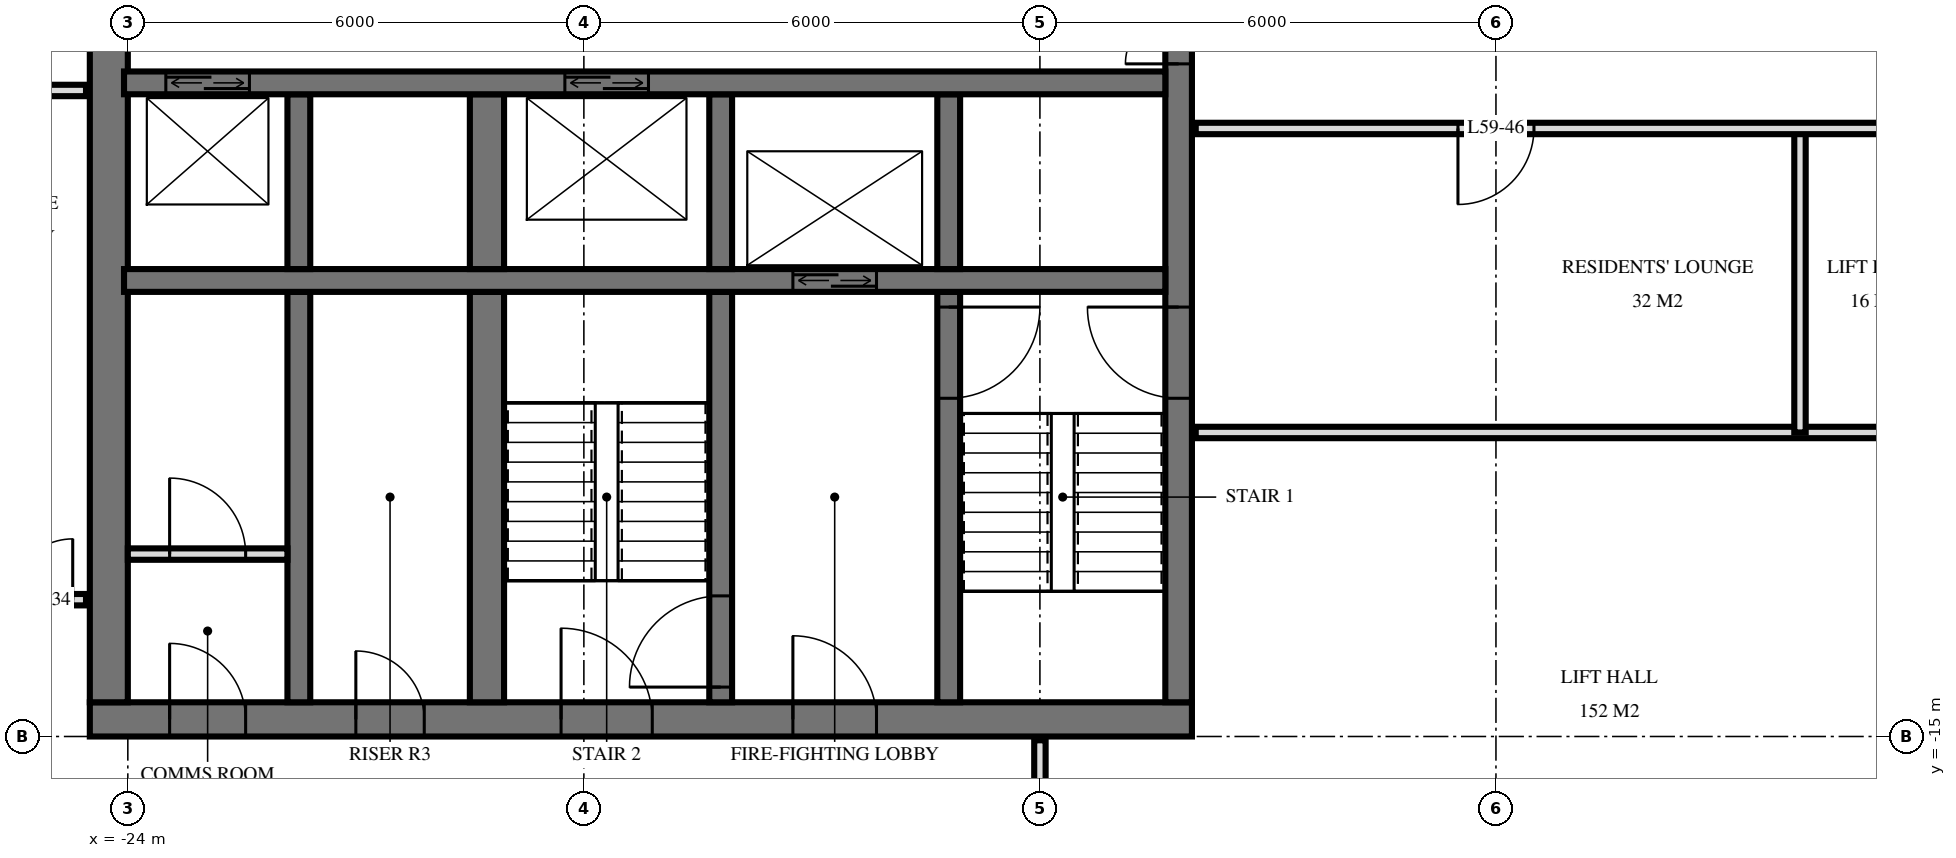
"""IFC4 building model, lengths in metres.
Left out: names, types, materials, properties, quantities, classifications, styles, units other than length and angle.
Written with IfcOpenShell. Run it as: python <this file> out.ifc"""

import sys

from ifc_helpers import new_model, si_unit, direction, frame, frame_2d, origin, place, context, subcontext, project, spatial, rectangle, extrude, element, fill, save


model = new_model("IFC4")
c1 = context("Model", 3, precision=1e-05, world=origin(), true_north=direction((0.0, 1.0)))
c2 = subcontext(c1, "Body", "Model", "MODEL_VIEW")
j1 = project(units=[si_unit("LENGTHUNIT", "METRE"), si_unit("PLANEANGLEUNIT", "RADIAN")], contexts=[c1])
p1 = place(None, origin())
s1 = spatial("IfcSite", under=j1, at=p1, CompositionType="ELEMENT")
p2 = place(p1, origin())
s2 = spatial("IfcBuilding", under=s1, at=p2, CompositionType="ELEMENT")
p3 = place(p2, frame((0.0, 0.0, 225.6)))
s3 = spatial("IfcBuildingStorey", under=s2, at=p3, CompositionType="ELEMENT", Elevation=225.6)
p4 = place(p3, frame((-24.5, -14.775, 0.0), z_axis=(0.0, 0.0, 1.0), x_axis=(1.0, 0.0, 0.0)))
e1 = element("IfcWall", 1, at=p4, inside=s3, PredefinedType="SHEAR", context=c2, shape_type="SweptSolid", body=[
    extrude(rectangle(XDim=14.5, YDim=0.45, at=frame_2d((7.25, 0.0))), origin(), (0.0, 0.0, 1.0), 3.5),
])
p5 = place(p4, frame((6.2, 0.0, 0.0)))
e2 = element("IfcOpeningElement", 2, at=p5, cuts=e1, PredefinedType="OPENING", context=c2, shape_type="SweptSolid", body=[
    extrude(rectangle(XDim=1.2, YDim=2.1, at=frame_2d((0.6, 1.05))), frame((0.0, 0.235, 0.0), z_axis=(0.0, -1.0, 0.0), x_axis=(1.0, 0.0, 0.0)), (0.0, 0.0, 1.0), 0.47),
])
p6 = place(p4, frame((9.25, 0.0, 0.0)))
e3 = element("IfcOpeningElement", 3, at=p6, cuts=e1, PredefinedType="OPENING", context=c2, shape_type="SweptSolid", body=[
    extrude(rectangle(XDim=1.1, YDim=2.1, at=frame_2d((0.55, 1.05))), frame((0.0, 0.235, 0.0), z_axis=(0.0, -1.0, 0.0), x_axis=(1.0, 0.0, 0.0)), (0.0, 0.0, 1.0), 0.47),
])
p7 = place(p4, frame((3.5, 0.0, 0.0)))
e4 = element("IfcOpeningElement", 4, at=p7, cuts=e1, PredefinedType="OPENING", context=c2, shape_type="SweptSolid", body=[
    extrude(rectangle(XDim=0.9, YDim=2.1, at=frame_2d((0.45, 1.05))), frame((0.0, 0.235, 0.0), z_axis=(0.0, -1.0, 0.0), x_axis=(1.0, 0.0, 0.0)), (0.0, 0.0, 1.0), 0.47),
])
p8 = place(p4, frame((1.05, 0.0, 0.0)))
e5 = element("IfcOpeningElement", 5, at=p8, cuts=e1, PredefinedType="OPENING", context=c2, shape_type="SweptSolid", body=[
    extrude(rectangle(XDim=1.0, YDim=2.1, at=frame_2d((0.5, 1.05))), frame((0.0, 0.235, 0.0), z_axis=(0.0, -1.0, 0.0), x_axis=(1.0, 0.0, 0.0)), (0.0, 0.0, 1.0), 0.47),
])
p9 = place(p3, frame((-10.175, -14.55, 0.0), z_axis=(0.0, 0.0, 1.0), x_axis=(0.0, 1.0, 0.0)))
e6 = element("IfcWall", 6, at=p9, inside=s3, PredefinedType="SHEAR", context=c2, shape_type="SweptSolid", body=[
    extrude(rectangle(XDim=14.1, YDim=0.35, at=frame_2d((7.05, 0.0))), origin(), (0.0, 0.0, 1.0), 3.5),
])
p10 = place(p9, frame((8.4, 0.0, 0.0)))
e7 = element("IfcOpeningElement", 7, at=p10, cuts=e6, PredefinedType="OPENING", context=c2, shape_type="SweptSolid", body=[
    extrude(rectangle(XDim=1.4, YDim=2.4, at=frame_2d((0.7, 1.2))), frame((0.0, 0.185, 0.0), z_axis=(0.0, -1.0, 0.0), x_axis=(1.0, 0.0, 0.0)), (0.0, 0.0, 1.0), 0.37),
])
p11 = place(p9, frame((10.0, 0.0, 0.0)))
e8 = element("IfcOpeningElement", 8, at=p11, cuts=e6, PredefinedType="OPENING", context=c2, shape_type="SweptSolid", body=[
    extrude(rectangle(XDim=1.4, YDim=2.4, at=frame_2d((0.7, 1.2))), frame((0.0, 0.185, 0.0), z_axis=(0.0, -1.0, 0.0), x_axis=(1.0, 0.0, 0.0)), (0.0, 0.0, 1.0), 0.37),
])
p12 = place(p9, frame((4.0, 0.0, 0.0)))
e9 = element("IfcOpeningElement", 9, at=p12, cuts=e6, PredefinedType="OPENING", context=c2, shape_type="SweptSolid", body=[
    extrude(rectangle(XDim=1.2, YDim=2.1, at=frame_2d((0.6, 1.05))), frame((0.0, 0.185, 0.0), z_axis=(0.0, -1.0, 0.0), x_axis=(1.0, 0.0, 0.0)), (0.0, 0.0, 1.0), 0.37),
])
p13 = place(p3, frame((-24.25, -14.55, 0.0), z_axis=(0.0, 0.0, 1.0), x_axis=(0.0, 1.0, 0.0)))
e10 = element("IfcWall", 10, at=p13, inside=s3, PredefinedType="SHEAR", context=c2, shape_type="SweptSolid", body=[
    extrude(rectangle(XDim=14.1, YDim=0.5, at=frame_2d((7.05, 0.0))), origin(), (0.0, 0.0, 1.0), 3.5),
])
p14 = place(p3, frame((-24.05, -6.4, 0.0), z_axis=(0.0, 0.0, 1.0), x_axis=(1.0, 0.0, 0.0)))
e11 = element("IfcWall", 11, at=p14, inside=s3, PredefinedType="SHEAR", context=c2, shape_type="SweptSolid", body=[
    extrude(rectangle(XDim=13.7, YDim=0.3, at=frame_2d((6.85, 0.0))), origin(), (0.0, 0.0, 1.0), 3.5),
])
p15 = place(p14, frame((0.55, 0.0, 0.0)))
e12 = element("IfcOpeningElement", 12, at=p15, cuts=e11, PredefinedType="OPENING", context=c2, shape_type="SweptSolid", body=[
    extrude(rectangle(XDim=1.1, YDim=2.1, at=frame_2d((0.55, 1.05))), frame((0.0, 0.16, 0.0), z_axis=(0.0, -1.0, 0.0), x_axis=(1.0, 0.0, 0.0)), (0.0, 0.0, 1.0), 0.32),
])
p16 = place(p14, frame((5.8, 0.0, 0.0)))
e13 = element("IfcOpeningElement", 13, at=p16, cuts=e11, PredefinedType="OPENING", context=c2, shape_type="SweptSolid", body=[
    extrude(rectangle(XDim=1.1, YDim=2.1, at=frame_2d((0.55, 1.05))), frame((0.0, 0.16, 0.0), z_axis=(0.0, -1.0, 0.0), x_axis=(1.0, 0.0, 0.0)), (0.0, 0.0, 1.0), 0.32),
])
p17 = place(p3, frame((-24.05, -9.0, 0.0), z_axis=(0.0, 0.0, 1.0), x_axis=(1.0, 0.0, 0.0)))
e14 = element("IfcWall", 14, at=p17, inside=s3, PredefinedType="SHEAR", context=c2, shape_type="SweptSolid", body=[
    extrude(rectangle(XDim=13.7, YDim=0.3, at=frame_2d((6.85, 0.0))), origin(), (0.0, 0.0, 1.0), 3.5),
])
p18 = place(p17, frame((8.8, 0.0, 0.0)))
e15 = element("IfcOpeningElement", 15, at=p18, cuts=e14, PredefinedType="OPENING", context=c2, shape_type="SweptSolid", body=[
    extrude(rectangle(XDim=1.1, YDim=2.1, at=frame_2d((0.55, 1.05))), frame((0.0, 0.16, 0.0), z_axis=(0.0, -1.0, 0.0), x_axis=(1.0, 0.0, 0.0)), (0.0, 0.0, 1.0), 0.32),
])
p19 = place(p3, frame((-13.2, -8.85, 0.0), z_axis=(0.0, 0.0, 1.0), x_axis=(0.0, 1.0, 0.0)))
e16 = element("IfcWall", 16, at=p19, inside=s3, PredefinedType="SHEAR", context=c2, shape_type="SweptSolid", body=[
    extrude(rectangle(XDim=2.3, YDim=0.3, at=frame_2d((1.15, 0.0))), origin(), (0.0, 0.0, 1.0), 3.5),
])
p20 = place(p3, frame((-13.2, -14.55, 0.0), z_axis=(0.0, 0.0, 1.0), x_axis=(0.0, 1.0, 0.0)))
e17 = element("IfcWall", 17, at=p20, inside=s3, PredefinedType="SHEAR", context=c2, shape_type="SweptSolid", body=[
    extrude(rectangle(XDim=5.4, YDim=0.3, at=frame_2d((2.7, 0.0))), origin(), (0.0, 0.0, 1.0), 3.5),
])
p21 = place(p20, frame((4.0, 0.0, 0.0)))
e18 = element("IfcOpeningElement", 18, at=p21, cuts=e17, PredefinedType="OPENING", context=c2, shape_type="SweptSolid", body=[
    extrude(rectangle(XDim=1.2, YDim=2.1, at=frame_2d((0.6, 1.05))), frame((0.0, 0.16, 0.0), z_axis=(0.0, -1.0, 0.0), x_axis=(1.0, 0.0, 0.0)), (0.0, 0.0, 1.0), 0.32),
])
p22 = place(p3, frame((-16.2, -8.85, 0.0), z_axis=(0.0, 0.0, 1.0), x_axis=(0.0, 1.0, 0.0)))
e19 = element("IfcWall", 19, at=p22, inside=s3, PredefinedType="SHEAR", context=c2, shape_type="SweptSolid", body=[
    extrude(rectangle(XDim=2.3, YDim=0.3, at=frame_2d((1.15, 0.0))), origin(), (0.0, 0.0, 1.0), 3.5),
])
p23 = place(p3, frame((-16.2, -14.55, 0.0), z_axis=(0.0, 0.0, 1.0), x_axis=(0.0, 1.0, 0.0)))
e20 = element("IfcWall", 20, at=p23, inside=s3, PredefinedType="SHEAR", context=c2, shape_type="SweptSolid", body=[
    extrude(rectangle(XDim=5.4, YDim=0.3, at=frame_2d((2.7, 0.0))), origin(), (0.0, 0.0, 1.0), 3.5),
])
p24 = place(p23, frame((0.2, 0.0, 0.0)))
e21 = element("IfcOpeningElement", 21, at=p24, cuts=e20, PredefinedType="OPENING", context=c2, shape_type="SweptSolid", body=[
    extrude(rectangle(XDim=1.2, YDim=2.1, at=frame_2d((0.6, 1.05))), frame((0.0, 0.16, 0.0), z_axis=(0.0, -1.0, 0.0), x_axis=(1.0, 0.0, 0.0)), (0.0, 0.0, 1.0), 0.32),
])
p25 = place(p3, frame((-19.275, -8.85, 0.0), z_axis=(0.0, 0.0, 1.0), x_axis=(0.0, 1.0, 0.0)))
e22 = element("IfcWall", 22, at=p25, inside=s3, PredefinedType="SHEAR", context=c2, shape_type="SweptSolid", body=[
    extrude(rectangle(XDim=2.3, YDim=0.45, at=frame_2d((1.15, 0.0))), origin(), (0.0, 0.0, 1.0), 3.5),
])
p26 = place(p3, frame((-19.275, -14.55, 0.0), z_axis=(0.0, 0.0, 1.0), x_axis=(0.0, 1.0, 0.0)))
e23 = element("IfcWall", 23, at=p26, inside=s3, PredefinedType="SHEAR", context=c2, shape_type="SweptSolid", body=[
    extrude(rectangle(XDim=5.4, YDim=0.45, at=frame_2d((2.7, 0.0))), origin(), (0.0, 0.0, 1.0), 3.5),
])
p27 = place(p3, frame((-21.75, -8.85, 0.0), z_axis=(0.0, 0.0, 1.0), x_axis=(0.0, 1.0, 0.0)))
e24 = element("IfcWall", 24, at=p27, inside=s3, PredefinedType="SHEAR", context=c2, shape_type="SweptSolid", body=[
    extrude(rectangle(XDim=2.3, YDim=0.3, at=frame_2d((1.15, 0.0))), origin(), (0.0, 0.0, 1.0), 3.5),
])
p28 = place(p3, frame((-21.75, -14.55, 0.0), z_axis=(0.0, 0.0, 1.0), x_axis=(0.0, 1.0, 0.0)))
e25 = element("IfcWall", 25, at=p28, inside=s3, PredefinedType="SHEAR", context=c2, shape_type="SweptSolid", body=[
    extrude(rectangle(XDim=5.4, YDim=0.3, at=frame_2d((2.7, 0.0))), origin(), (0.0, 0.0, 1.0), 3.5),
])
p29 = place(p3, frame((-24.0, -12.6, 0.0), z_axis=(0.0, 0.0, 1.0), x_axis=(1.0, 0.0, 0.0)))
e26 = element("IfcWall", 26, at=p29, inside=s3, PredefinedType="PARTITIONING", context=c2, shape_type="SweptSolid", body=[
    extrude(rectangle(XDim=2.1, YDim=0.15, at=frame_2d((1.05, 0.0))), origin(), (0.0, 0.0, 1.0), 3.2),
])
p30 = place(p29, frame((0.55, 0.0, 0.0)))
e27 = element("IfcOpeningElement", 27, at=p30, cuts=e26, PredefinedType="OPENING", context=c2, shape_type="SweptSolid", body=[
    extrude(rectangle(XDim=1.0, YDim=2.1, at=frame_2d((0.5, 1.05))), frame((0.0, 0.085, 0.0), z_axis=(0.0, -1.0, 0.0), x_axis=(1.0, 0.0, 0.0)), (0.0, 0.0, 1.0), 0.17),
])
p31 = place(p3, frame((-2.0, -11.0, 0.0), z_axis=(0.0, 0.0, 1.0), x_axis=(0.0, 1.0, 0.0)))
e28 = element("IfcWall", 28, at=p31, inside=s3, PredefinedType="PARTITIONING", context=c2, shape_type="SweptSolid", body=[
    extrude(rectangle(XDim=4.0, YDim=0.15, at=frame_2d((2.0, 0.0))), origin(), (0.0, 0.0, 1.0), 3.22),
])
p32 = place(p3, frame((-12.0, -18.0, 0.0), z_axis=(0.0, 0.0, 1.0), x_axis=(0.0, 1.0, 0.0)))
e29 = element("IfcWall", 29, at=p32, inside=s3, PredefinedType="PARTITIONING", context=c2, shape_type="SweptSolid", body=[
    extrude(rectangle(XDim=2.95, YDim=0.15, at=frame_2d((1.475, 0.0))), origin(), (0.0, 0.0, 1.0), 3.22),
])
p33 = place(p32, frame((1.0, 0.0, 0.0)))
e30 = element("IfcOpeningElement", 30, at=p33, cuts=e29, PredefinedType="OPENING", context=c2, shape_type="SweptSolid", body=[
    extrude(rectangle(XDim=1.0, YDim=2.1, at=frame_2d((0.5, 1.05))), frame((0.0, 0.085, 0.0), z_axis=(0.0, -1.0, 0.0), x_axis=(1.0, 0.0, 0.0)), (0.0, 0.0, 1.0), 0.17),
])
p34 = place(p3, frame((-25.7, -13.2, 0.0), z_axis=(0.0, 0.0, 1.0), x_axis=(1.0, 0.0, 0.0)))
e31 = element("IfcWall", 31, at=p34, inside=s3, PredefinedType="PARTITIONING", context=c2, shape_type="SweptSolid", body=[
    extrude(rectangle(XDim=1.15, YDim=0.15, at=frame_2d((0.575, 0.0))), origin(), (0.0, 0.0, 1.0), 3.22),
])
p35 = place(p34, frame((0.175, 0.0, 0.0)))
e32 = element("IfcOpeningElement", 32, at=p35, cuts=e31, PredefinedType="OPENING", context=c2, shape_type="SweptSolid", body=[
    extrude(rectangle(XDim=0.8, YDim=2.1, at=frame_2d((0.4, 1.05))), frame((0.0, 0.085, 0.0), z_axis=(0.0, -1.0, 0.0), x_axis=(1.0, 0.0, 0.0)), (0.0, 0.0, 1.0), 0.17),
])
p36 = place(p3, frame((-9.95, -11.0, 0.0), z_axis=(0.0, 0.0, 1.0), x_axis=(1.0, 0.0, 0.0)))
e33 = element("IfcWall", 33, at=p36, inside=s3, PredefinedType="PARTITIONING", context=c2, shape_type="SweptSolid", body=[
    extrude(rectangle(XDim=19.9, YDim=0.15, at=frame_2d((9.95, 0.0))), origin(), (0.0, 0.0, 1.0), 3.22),
])
p37 = place(p36, frame((9.45, 0.0, 0.0)))
e34 = element("IfcOpeningElement", 34, at=p37, cuts=e33, PredefinedType="OPENING", context=c2, shape_type="SweptSolid", body=[
    extrude(rectangle(XDim=1.0, YDim=2.1, at=frame_2d((0.5, 1.05))), frame((0.0, 0.085, 0.0), z_axis=(0.0, -1.0, 0.0), x_axis=(1.0, 0.0, 0.0)), (0.0, 0.0, 1.0), 0.17),
])
p38 = place(p36, frame((15.45, 0.0, 0.0)))
e35 = element("IfcOpeningElement", 35, at=p38, cuts=e33, PredefinedType="OPENING", context=c2, shape_type="SweptSolid", body=[
    extrude(rectangle(XDim=1.0, YDim=2.1, at=frame_2d((0.5, 1.05))), frame((0.0, 0.085, 0.0), z_axis=(0.0, -1.0, 0.0), x_axis=(1.0, 0.0, 0.0)), (0.0, 0.0, 1.0), 0.17),
])
p39 = place(p3, frame((-9.95, -7.0, 0.0), z_axis=(0.0, 0.0, 1.0), x_axis=(1.0, 0.0, 0.0)))
e36 = element("IfcWall", 36, at=p39, inside=s3, PredefinedType="PARTITIONING", context=c2, shape_type="SweptSolid", body=[
    extrude(rectangle(XDim=19.9, YDim=0.15, at=frame_2d((9.95, 0.0))), origin(), (0.0, 0.0, 1.0), 3.22),
])
p40 = place(p39, frame((9.45, 0.0, 0.0)))
e37 = element("IfcOpeningElement", 37, at=p40, cuts=e36, PredefinedType="OPENING", context=c2, shape_type="SweptSolid", body=[
    extrude(rectangle(XDim=1.0, YDim=2.1, at=frame_2d((0.5, 1.05))), frame((0.0, 0.085, 0.0), z_axis=(0.0, -1.0, 0.0), x_axis=(1.0, 0.0, 0.0)), (0.0, 0.0, 1.0), 0.17),
])
p41 = place(p39, frame((3.45, 0.0, 0.0)))
e38 = element("IfcOpeningElement", 38, at=p41, cuts=e36, PredefinedType="OPENING", context=c2, shape_type="SweptSolid", body=[
    extrude(rectangle(XDim=1.0, YDim=2.1, at=frame_2d((0.5, 1.05))), frame((0.0, 0.085, 0.0), z_axis=(0.0, -1.0, 0.0), x_axis=(1.0, 0.0, 0.0)), (0.0, 0.0, 1.0), 0.17),
])
p42 = place(p3, frame((-26.82, -6.5, 0.0), z_axis=(0.0, 0.0, 1.0), x_axis=(1.0, 0.0, 0.0)))
e39 = element("IfcWall", 39, at=p42, inside=s3, PredefinedType="PARTITIONING", context=c2, shape_type="SweptSolid", body=[
    extrude(rectangle(XDim=2.27, YDim=0.15, at=frame_2d((1.135, 0.0))), origin(), (0.0, 0.0, 1.0), 3.22),
])
p43 = place(p42, frame((0.62, 0.0, 0.0)))
e40 = element("IfcOpeningElement", 40, at=p43, cuts=e39, PredefinedType="OPENING", context=c2, shape_type="SweptSolid", body=[
    extrude(rectangle(XDim=0.9, YDim=2.1, at=frame_2d((0.45, 1.05))), frame((0.0, 0.085, 0.0), z_axis=(0.0, -1.0, 0.0), x_axis=(1.0, 0.0, 0.0)), (0.0, 0.0, 1.0), 0.17),
])
p44 = place(p15, origin())
e41 = element("IfcDoor", 41, at=p44, inside=s3, OperationType="DOUBLE_DOOR_SLIDING", PredefinedType="USERDEFINED", context=c2, shape_type="SweptSolid", body=[
    extrude(rectangle(XDim=1.1, YDim=2.1, at=frame_2d((0.55, 1.05))), frame((0.0, 0.025, 0.0), z_axis=(0.0, -1.0, 0.0), x_axis=(1.0, 0.0, 0.0)), (0.0, 0.0, 1.0), 0.05),
])
fill(e12, e41)
p45 = place(p18, origin())
e42 = element("IfcDoor", 42, at=p45, inside=s3, OperationType="DOUBLE_DOOR_SLIDING", PredefinedType="USERDEFINED", context=c2, shape_type="SweptSolid", body=[
    extrude(rectangle(XDim=1.1, YDim=2.1, at=frame_2d((0.55, 1.05))), frame((0.0, 0.025, 0.0), z_axis=(0.0, -1.0, 0.0), x_axis=(1.0, 0.0, 0.0)), (0.0, 0.0, 1.0), 0.05),
])
fill(e15, e42)
p46 = place(p16, origin())
e43 = element("IfcDoor", 43, at=p46, inside=s3, OperationType="DOUBLE_DOOR_SLIDING", PredefinedType="USERDEFINED", context=c2, shape_type="SweptSolid", body=[
    extrude(rectangle(XDim=1.1, YDim=2.1, at=frame_2d((0.55, 1.05))), frame((0.0, 0.025, 0.0), z_axis=(0.0, -1.0, 0.0), x_axis=(1.0, 0.0, 0.0)), (0.0, 0.0, 1.0), 0.05),
])
fill(e13, e43)
p47 = place(p10, origin())
e44 = element("IfcDoor", 44, at=p47, inside=s3, OperationType="DOUBLE_DOOR_SINGLE_SWING", PredefinedType="DOOR", context=c2, shape_type="SweptSolid", body=[
    extrude(rectangle(XDim=1.4, YDim=2.4, at=frame_2d((0.7, 1.2))), frame((0.0, 0.025, 0.0), z_axis=(0.0, -1.0, 0.0), x_axis=(1.0, 0.0, 0.0)), (0.0, 0.0, 1.0), 0.05),
])
fill(e7, e44)
p48 = place(p12, origin())
e45 = element("IfcDoor", 45, at=p48, inside=s3, OperationType="SINGLE_SWING_LEFT", PredefinedType="DOOR", context=c2, shape_type="SweptSolid", body=[
    extrude(rectangle(XDim=1.2, YDim=2.1, at=frame_2d((0.6, 1.05))), frame((0.0, 0.025, 0.0), z_axis=(0.0, -1.0, 0.0), x_axis=(1.0, 0.0, 0.0)), (0.0, 0.0, 1.0), 0.05),
])
fill(e9, e45)
p49 = place(p5, origin())
e46 = element("IfcDoor", 46, at=p49, inside=s3, OperationType="SINGLE_SWING_RIGHT", PredefinedType="DOOR", context=c2, shape_type="SweptSolid", body=[
    extrude(rectangle(XDim=1.2, YDim=2.1, at=frame_2d((0.6, 1.05))), frame((0.0, 0.025, 0.0), z_axis=(0.0, -1.0, 0.0), x_axis=(1.0, 0.0, 0.0)), (0.0, 0.0, 1.0), 0.05),
])
fill(e2, e46)
p50 = place(p6, origin())
e47 = element("IfcDoor", 47, at=p50, inside=s3, OperationType="SINGLE_SWING_RIGHT", PredefinedType="DOOR", context=c2, shape_type="SweptSolid", body=[
    extrude(rectangle(XDim=1.1, YDim=2.1, at=frame_2d((0.55, 1.05))), frame((0.0, 0.025, 0.0), z_axis=(0.0, -1.0, 0.0), x_axis=(1.0, 0.0, 0.0)), (0.0, 0.0, 1.0), 0.05),
])
fill(e3, e47)
p51 = place(p7, origin())
e48 = element("IfcDoor", 48, at=p51, inside=s3, OperationType="SINGLE_SWING_RIGHT", PredefinedType="DOOR", context=c2, shape_type="SweptSolid", body=[
    extrude(rectangle(XDim=0.9, YDim=2.1, at=frame_2d((0.45, 1.05))), frame((0.0, 0.025, 0.0), z_axis=(0.0, -1.0, 0.0), x_axis=(1.0, 0.0, 0.0)), (0.0, 0.0, 1.0), 0.05),
])
fill(e4, e48)
p52 = place(p8, origin())
e49 = element("IfcDoor", 49, at=p52, inside=s3, OperationType="SINGLE_SWING_RIGHT", PredefinedType="DOOR", context=c2, shape_type="SweptSolid", body=[
    extrude(rectangle(XDim=1.0, YDim=2.1, at=frame_2d((0.5, 1.05))), frame((0.0, 0.025, 0.0), z_axis=(0.0, -1.0, 0.0), x_axis=(1.0, 0.0, 0.0)), (0.0, 0.0, 1.0), 0.05),
])
fill(e5, e49)
p53 = place(p21, frame((0.6, 0.0, 0.0), z_axis=(0.0, 0.0, 1.0), x_axis=(-1.0, 0.0, 0.0)))
e50 = element("IfcDoor", 50, at=p53, inside=s3, OperationType="SINGLE_SWING_RIGHT", PredefinedType="DOOR", context=c2, shape_type="SweptSolid", body=[
    extrude(rectangle(XDim=1.2, YDim=2.1, at=frame_2d((0.0, 1.05))), frame((0.0, -0.025, 0.0), z_axis=(0.0, 1.0, 0.0), x_axis=(-1.0, 0.0, 0.0)), (0.0, 0.0, 1.0), 0.05),
])
fill(e18, e50)
p54 = place(p24, origin())
e51 = element("IfcDoor", 51, at=p54, inside=s3, OperationType="SINGLE_SWING_RIGHT", PredefinedType="DOOR", context=c2, shape_type="SweptSolid", body=[
    extrude(rectangle(XDim=1.2, YDim=2.1, at=frame_2d((0.6, 1.05))), frame((0.0, 0.025, 0.0), z_axis=(0.0, -1.0, 0.0), x_axis=(1.0, 0.0, 0.0)), (0.0, 0.0, 1.0), 0.05),
])
fill(e21, e51)
p55 = place(p30, origin())
e52 = element("IfcDoor", 52, at=p55, inside=s3, OperationType="SINGLE_SWING_RIGHT", PredefinedType="DOOR", context=c2, shape_type="SweptSolid", body=[
    extrude(rectangle(XDim=1.0, YDim=2.1, at=frame_2d((0.5, 1.05))), frame((0.0, 0.025, 0.0), z_axis=(0.0, -1.0, 0.0), x_axis=(1.0, 0.0, 0.0)), (0.0, 0.0, 1.0), 0.05),
])
fill(e27, e52)
p56 = place(p35, origin())
e53 = element("IfcDoor", 53, at=p56, inside=s3, OperationType="SINGLE_SWING_LEFT", PredefinedType="DOOR", context=c2, shape_type="SweptSolid", body=[
    extrude(rectangle(XDim=0.8, YDim=2.1, at=frame_2d((0.4, 1.05))), frame((0.0, 0.025, 0.0), z_axis=(0.0, -1.0, 0.0), x_axis=(1.0, 0.0, 0.0)), (0.0, 0.0, 1.0), 0.05),
])
fill(e32, e53)
p57 = place(p41, frame((0.5, 0.0, 0.0), z_axis=(0.0, 0.0, 1.0), x_axis=(-1.0, 0.0, 0.0)))
e54 = element("IfcDoor", 54, at=p57, inside=s3, OperationType="SINGLE_SWING_LEFT", PredefinedType="DOOR", context=c2, shape_type="SweptSolid", body=[
    extrude(rectangle(XDim=1.0, YDim=2.1, at=frame_2d((0.0, 1.05))), frame((0.0, -0.025, 0.0), z_axis=(0.0, 1.0, 0.0), x_axis=(-1.0, 0.0, 0.0)), (0.0, 0.0, 1.0), 0.05),
])
fill(e38, e54)
save(model, sys.argv[1])
